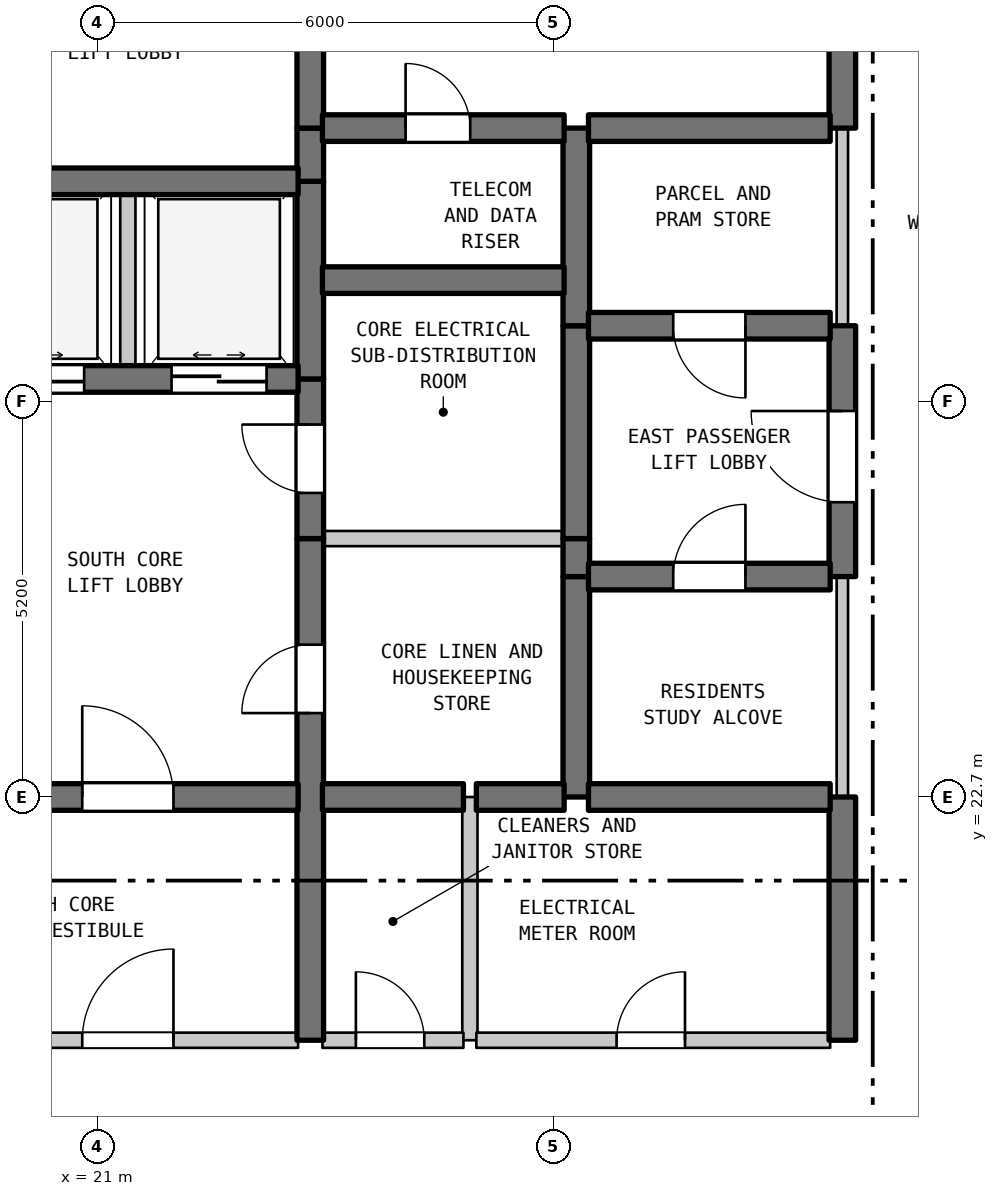
"""IFC4 building model, lengths in metres.
Left out: names, types, materials, properties, quantities, classifications, styles, units other than length and angle.
Written with IfcOpenShell. Run it as: python <this file> out.ifc"""

import sys

from ifc_helpers import new_model, si_unit, direction, frame, frame_2d, origin, place, context, subcontext, project, spatial, rectangle, extrude, element, fill, save


model = new_model("IFC4")
c1 = context("Model", 3, precision=1e-05, world=origin(), true_north=direction((0.0, 1.0)))
c2 = subcontext(c1, "Body", "Model", "MODEL_VIEW")
j1 = project(units=[si_unit("LENGTHUNIT", "METRE"), si_unit("PLANEANGLEUNIT", "RADIAN")], contexts=[c1])
p1 = place(None, origin())
s1 = spatial("IfcSite", under=j1, at=p1, CompositionType="ELEMENT")
p2 = place(p1, origin())
s2 = spatial("IfcBuilding", under=s1, at=p2, CompositionType="ELEMENT")
p3 = place(p2, frame((0.0, 0.0, 291.7)))
s3 = spatial("IfcBuildingStorey", under=s2, at=p3, CompositionType="ELEMENT", Elevation=291.7)
p4 = place(p3, frame((21.4, 28.2, 0.0), z_axis=(0.0, 0.0, 1.0), x_axis=(0.0, 1.0, 0.0)))
e1 = element("IfcWall", 1, at=p4, inside=s3, PredefinedType="STANDARD", context=c2, shape_type="SweptSolid", body=[
    extrude(rectangle(XDim=2.6, YDim=0.2, at=frame_2d((1.3, 0.0))), origin(), (0.0, 0.0, 1.0), 3.39),
])
p5 = place(p3, frame((23.8, 19.5, 0.0), z_axis=(0.0, 0.0, 1.0), x_axis=(0.0, 1.0, 0.0)))
e2 = element("IfcWall", 2, at=p5, inside=s3, PredefinedType="SHEAR", context=c2, shape_type="SweptSolid", body=[
    extrude(rectangle(XDim=6.6, YDim=0.35, at=frame_2d((3.3, 0.0))), origin(), (0.0, 0.0, 1.0), 3.39),
])
p6 = place(p5, frame((4.304, 0.0, 0.0)))
e3 = element("IfcOpeningElement", 3, at=p6, cuts=e2, PredefinedType="OPENING", context=c2, shape_type="SweptSolid", body=[
    extrude(rectangle(XDim=0.9, YDim=2.15, at=frame_2d((0.45, 1.075))), frame((0.0, 0.185, 0.0), z_axis=(0.0, -1.0, 0.0), x_axis=(1.0, 0.0, 0.0)), (0.0, 0.0, 1.0), 0.37),
])
p7 = place(p3, frame((23.8, 26.1, 0.0), z_axis=(0.0, 0.0, 1.0), x_axis=(0.0, 1.0, 0.0)))
e4 = element("IfcWall", 4, at=p7, inside=s3, PredefinedType="SHEAR", context=c2, shape_type="SweptSolid", body=[
    extrude(rectangle(XDim=2.1, YDim=0.35, at=frame_2d((1.05, 0.0))), origin(), (0.0, 0.0, 1.0), 3.39),
])
p8 = place(p7, frame((0.6, 0.0, 0.0)))
e5 = element("IfcOpeningElement", 5, at=p8, cuts=e4, PredefinedType="OPENING", context=c2, shape_type="SweptSolid", body=[
    extrude(rectangle(XDim=0.9, YDim=2.15, at=frame_2d((0.45, 1.075))), frame((0.0, 0.185, 0.0), z_axis=(0.0, -1.0, 0.0), x_axis=(1.0, 0.0, 0.0)), (0.0, 0.0, 1.0), 0.37),
])
p9 = place(p3, frame((23.8, 28.2, 0.0), z_axis=(0.0, 0.0, 1.0), x_axis=(0.0, 1.0, 0.0)))
e6 = element("IfcWall", 6, at=p9, inside=s3, PredefinedType="SHEAR", context=c2, shape_type="SweptSolid", body=[
    extrude(rectangle(XDim=2.6, YDim=0.35, at=frame_2d((1.3, 0.0))), origin(), (0.0, 0.0, 1.0), 3.39),
])
p10 = place(p3, frame((23.8, 30.8, 0.0), z_axis=(0.0, 0.0, 1.0), x_axis=(0.0, 1.0, 0.0)))
e7 = element("IfcWall", 7, at=p10, inside=s3, PredefinedType="SHEAR", context=c2, shape_type="SweptSolid", body=[
    extrude(rectangle(XDim=0.7, YDim=0.35, at=frame_2d((0.35, 0.0))), origin(), (0.0, 0.0, 1.0), 3.39),
])
p11 = place(p3, frame((23.8, 31.5, 0.0), z_axis=(0.0, 0.0, 1.0), x_axis=(0.0, 1.0, 0.0)))
e8 = element("IfcWall", 8, at=p11, inside=s3, PredefinedType="SHEAR", context=c2, shape_type="SweptSolid", body=[
    extrude(rectangle(XDim=3.5, YDim=0.35, at=frame_2d((1.75, 0.0))), origin(), (0.0, 0.0, 1.0), 3.39),
])
p12 = place(p11, frame((1.127, 0.0, 0.0)))
e9 = element("IfcOpeningElement", 9, at=p12, cuts=e8, PredefinedType="OPENING", context=c2, shape_type="SweptSolid", body=[
    extrude(rectangle(XDim=1.1, YDim=2.15, at=frame_2d((0.55, 1.075))), frame((0.0, 0.185, 0.0), z_axis=(0.0, -1.0, 0.0), x_axis=(1.0, 0.0, 0.0)), (0.0, 0.0, 1.0), 0.37),
])
p13 = place(p3, frame((25.9, 19.5, 0.0), z_axis=(0.0, 0.0, 1.0), x_axis=(0.0, 1.0, 0.0)))
e10 = element("IfcWall", 10, at=p13, inside=s3, PredefinedType="STANDARD", context=c2, shape_type="SweptSolid", body=[
    extrude(rectangle(XDim=3.2, YDim=0.2, at=frame_2d((1.6, 0.0))), origin(), (0.0, 0.0, 1.0), 3.39),
])
p14 = place(p3, frame((27.3, 22.7, 0.0), z_axis=(0.0, 0.0, 1.0), x_axis=(0.0, 1.0, 0.0)))
e11 = element("IfcWall", 11, at=p14, inside=s3, PredefinedType="SHEAR", context=c2, shape_type="SweptSolid", body=[
    extrude(rectangle(XDim=2.9, YDim=0.35, at=frame_2d((1.45, 0.0))), origin(), (0.0, 0.0, 1.0), 3.39),
])
p15 = place(p3, frame((27.3, 25.6, 0.0), z_axis=(0.0, 0.0, 1.0), x_axis=(0.0, 1.0, 0.0)))
e12 = element("IfcWall", 12, at=p15, inside=s3, PredefinedType="SHEAR", context=c2, shape_type="SweptSolid", body=[
    extrude(rectangle(XDim=0.5, YDim=0.35, at=frame_2d((0.25, 0.0))), origin(), (0.0, 0.0, 1.0), 3.39),
])
p16 = place(p3, frame((27.3, 26.1, 0.0), z_axis=(0.0, 0.0, 1.0), x_axis=(0.0, 1.0, 0.0)))
e13 = element("IfcWall", 13, at=p16, inside=s3, PredefinedType="SHEAR", context=c2, shape_type="SweptSolid", body=[
    extrude(rectangle(XDim=2.8, YDim=0.35, at=frame_2d((1.4, 0.0))), origin(), (0.0, 0.0, 1.0), 3.39),
])
p17 = place(p3, frame((27.3, 28.9, 0.0), z_axis=(0.0, 0.0, 1.0), x_axis=(0.0, 1.0, 0.0)))
e14 = element("IfcWall", 14, at=p17, inside=s3, PredefinedType="SHEAR", context=c2, shape_type="SweptSolid", body=[
    extrude(rectangle(XDim=2.6, YDim=0.35, at=frame_2d((1.3, 0.0))), origin(), (0.0, 0.0, 1.0), 3.39),
])
p18 = place(p3, frame((30.8, 19.5, 0.0), z_axis=(0.0, 0.0, 1.0), x_axis=(0.0, 1.0, 0.0)))
e15 = element("IfcWall", 15, at=p18, inside=s3, PredefinedType="SHEAR", context=c2, shape_type="SweptSolid", body=[
    extrude(rectangle(XDim=3.2, YDim=0.35, at=frame_2d((1.6, 0.0))), origin(), (0.0, 0.0, 1.0), 3.39),
])
p19 = place(p3, frame((30.8, 22.7, 0.0), z_axis=(0.0, 0.0, 1.0), x_axis=(0.0, 1.0, 0.0)))
e16 = element("IfcWall", 16, at=p19, inside=s3, PredefinedType="STANDARD", context=c2, shape_type="SweptSolid", body=[
    extrude(rectangle(XDim=2.9, YDim=0.15, at=frame_2d((1.45, 0.0))), origin(), (0.0, 0.0, 1.0), 3.39),
])
p20 = place(p3, frame((30.8, 25.6, 0.0), z_axis=(0.0, 0.0, 1.0), x_axis=(0.0, 1.0, 0.0)))
e17 = element("IfcWall", 17, at=p20, inside=s3, PredefinedType="SHEAR", context=c2, shape_type="SweptSolid", body=[
    extrude(rectangle(XDim=3.3, YDim=0.35, at=frame_2d((1.65, 0.0))), origin(), (0.0, 0.0, 1.0), 3.39),
])
p21 = place(p20, frame((0.978, 0.0, 0.0)))
e18 = element("IfcOpeningElement", 18, at=p21, cuts=e17, PredefinedType="OPENING", context=c2, shape_type="SweptSolid", body=[
    extrude(rectangle(XDim=1.2, YDim=2.2, at=frame_2d((0.6, 1.1))), frame((0.0, 0.185, 0.0), z_axis=(0.0, -1.0, 0.0), x_axis=(1.0, 0.0, 0.0)), (0.0, 0.0, 1.0), 0.37),
])
p22 = place(p3, frame((30.8, 28.9, 0.0), z_axis=(0.0, 0.0, 1.0), x_axis=(0.0, 1.0, 0.0)))
e19 = element("IfcWall", 19, at=p22, inside=s3, PredefinedType="STANDARD", context=c2, shape_type="SweptSolid", body=[
    extrude(rectangle(XDim=2.6, YDim=0.15, at=frame_2d((1.3, 0.0))), origin(), (0.0, 0.0, 1.0), 3.39),
])
p23 = place(p3, frame((30.8, 31.5, 0.0), z_axis=(0.0, 0.0, 1.0), x_axis=(0.0, 1.0, 0.0)))
e20 = element("IfcWall", 20, at=p23, inside=s3, PredefinedType="SHEAR", context=c2, shape_type="SweptSolid", body=[
    extrude(rectangle(XDim=3.5, YDim=0.35, at=frame_2d((1.75, 0.0))), origin(), (0.0, 0.0, 1.0), 3.39),
])
p24 = place(p23, frame((1.15, 0.0, 0.0)))
e21 = element("IfcOpeningElement", 21, at=p24, cuts=e20, PredefinedType="OPENING", context=c2, shape_type="SweptSolid", body=[
    extrude(rectangle(XDim=1.2, YDim=2.2, at=frame_2d((0.6, 1.1))), frame((0.0, 0.185, 0.0), z_axis=(0.0, -1.0, 0.0), x_axis=(1.0, 0.0, 0.0)), (0.0, 0.0, 1.0), 0.37),
])
p25 = place(p3, frame((19.16, 19.5, 0.0), z_axis=(0.0, 0.0, 1.0), x_axis=(1.0, 0.0, 0.0)))
e22 = element("IfcWall", 22, at=p25, inside=s3, PredefinedType="STANDARD", context=c2, shape_type="SweptSolid", body=[
    extrude(rectangle(XDim=4.48, YDim=0.2, at=frame_2d((2.24, 0.0))), origin(), (0.0, 0.0, 1.0), 3.39),
])
p26 = place(p25, frame((1.64, 0.0, 0.0)))
e23 = element("IfcOpeningElement", 23, at=p26, cuts=e22, PredefinedType="OPENING", context=c2, shape_type="SweptSolid", body=[
    extrude(rectangle(XDim=1.2, YDim=2.2, at=frame_2d((0.6, 1.1))), frame((0.0, 0.11, 0.0), z_axis=(0.0, -1.0, 0.0), x_axis=(1.0, 0.0, 0.0)), (0.0, 0.0, 1.0), 0.22),
])
p27 = place(p3, frame((23.96, 19.5, 0.0), z_axis=(0.0, 0.0, 1.0), x_axis=(1.0, 0.0, 0.0)))
e24 = element("IfcWall", 24, at=p27, inside=s3, PredefinedType="STANDARD", context=c2, shape_type="SweptSolid", body=[
    extrude(rectangle(XDim=1.855, YDim=0.2, at=frame_2d((0.927, 0.0))), origin(), (0.0, 0.0, 1.0), 3.39),
])
p28 = place(p27, frame((0.44, 0.0, 0.0)))
e25 = element("IfcOpeningElement", 25, at=p28, cuts=e24, PredefinedType="OPENING", context=c2, shape_type="SweptSolid", body=[
    extrude(rectangle(XDim=0.9, YDim=2.15, at=frame_2d((0.45, 1.075))), frame((0.0, 0.11, 0.0), z_axis=(0.0, -1.0, 0.0), x_axis=(1.0, 0.0, 0.0)), (0.0, 0.0, 1.0), 0.22),
])
p29 = place(p3, frame((25.985, 19.5, 0.0), z_axis=(0.0, 0.0, 1.0), x_axis=(1.0, 0.0, 0.0)))
e26 = element("IfcWall", 26, at=p29, inside=s3, PredefinedType="STANDARD", context=c2, shape_type="SweptSolid", body=[
    extrude(rectangle(XDim=4.655, YDim=0.2, at=frame_2d((2.327, 0.0))), origin(), (0.0, 0.0, 1.0), 3.39),
])
p30 = place(p29, frame((1.845, 0.0, 0.0)))
e27 = element("IfcOpeningElement", 27, at=p30, cuts=e26, PredefinedType="OPENING", context=c2, shape_type="SweptSolid", body=[
    extrude(rectangle(XDim=0.9, YDim=2.15, at=frame_2d((0.45, 1.075))), frame((0.0, 0.11, 0.0), z_axis=(0.0, -1.0, 0.0), x_axis=(1.0, 0.0, 0.0)), (0.0, 0.0, 1.0), 0.22),
])
p31 = place(p3, frame((19.16, 22.7, 0.0), z_axis=(0.0, 0.0, 1.0), x_axis=(1.0, 0.0, 0.0)))
e28 = element("IfcWall", 28, at=p31, inside=s3, PredefinedType="SHEAR", context=c2, shape_type="SweptSolid", body=[
    extrude(rectangle(XDim=4.48, YDim=0.35, at=frame_2d((2.24, 0.0))), origin(), (0.0, 0.0, 1.0), 3.39),
])
p32 = place(p31, frame((1.64, 0.0, 0.0)))
e29 = element("IfcOpeningElement", 29, at=p32, cuts=e28, PredefinedType="OPENING", context=c2, shape_type="SweptSolid", body=[
    extrude(rectangle(XDim=1.2, YDim=2.2, at=frame_2d((0.6, 1.1))), frame((0.0, 0.185, 0.0), z_axis=(0.0, -1.0, 0.0), x_axis=(1.0, 0.0, 0.0)), (0.0, 0.0, 1.0), 0.37),
])
p33 = place(p3, frame((23.96, 22.7, 0.0), z_axis=(0.0, 0.0, 1.0), x_axis=(1.0, 0.0, 0.0)))
e30 = element("IfcWall", 30, at=p33, inside=s3, PredefinedType="SHEAR", context=c2, shape_type="SweptSolid", body=[
    extrude(rectangle(XDim=1.855, YDim=0.35, at=frame_2d((0.927, 0.0))), origin(), (0.0, 0.0, 1.0), 3.39),
])
p34 = place(p3, frame((25.985, 22.7, 0.0), z_axis=(0.0, 0.0, 1.0), x_axis=(1.0, 0.0, 0.0)))
e31 = element("IfcWall", 31, at=p34, inside=s3, PredefinedType="SHEAR", context=c2, shape_type="SweptSolid", body=[
    extrude(rectangle(XDim=1.155, YDim=0.35, at=frame_2d((0.577, 0.0))), origin(), (0.0, 0.0, 1.0), 3.39),
])
p35 = place(p3, frame((27.46, 22.7, 0.0), z_axis=(0.0, 0.0, 1.0), x_axis=(1.0, 0.0, 0.0)))
e32 = element("IfcWall", 32, at=p35, inside=s3, PredefinedType="SHEAR", context=c2, shape_type="SweptSolid", body=[
    extrude(rectangle(XDim=3.18, YDim=0.35, at=frame_2d((1.59, 0.0))), origin(), (0.0, 0.0, 1.0), 3.39),
])
p36 = place(p3, frame((27.46, 25.6, 0.0), z_axis=(0.0, 0.0, 1.0), x_axis=(1.0, 0.0, 0.0)))
e33 = element("IfcWall", 33, at=p36, inside=s3, PredefinedType="SHEAR", context=c2, shape_type="SweptSolid", body=[
    extrude(rectangle(XDim=3.18, YDim=0.35, at=frame_2d((1.59, 0.0))), origin(), (0.0, 0.0, 1.0), 3.39),
])
p37 = place(p36, frame((1.115, 0.0, 0.0)))
e34 = element("IfcOpeningElement", 34, at=p37, cuts=e33, PredefinedType="OPENING", context=c2, shape_type="SweptSolid", body=[
    extrude(rectangle(XDim=0.95, YDim=2.15, at=frame_2d((0.475, 1.075))), frame((0.0, 0.185, 0.0), z_axis=(0.0, -1.0, 0.0), x_axis=(1.0, 0.0, 0.0)), (0.0, 0.0, 1.0), 0.37),
])
p38 = place(p3, frame((23.96, 26.1, 0.0), z_axis=(0.0, 0.0, 1.0), x_axis=(1.0, 0.0, 0.0)))
e35 = element("IfcWall", 35, at=p38, inside=s3, PredefinedType="STANDARD", context=c2, shape_type="SweptSolid", body=[
    extrude(rectangle(XDim=3.18, YDim=0.2, at=frame_2d((1.59, 0.0))), origin(), (0.0, 0.0, 1.0), 3.39),
])
p39 = place(p3, frame((19.16, 28.2, 0.0), z_axis=(0.0, 0.0, 1.0), x_axis=(1.0, 0.0, 0.0)))
e36 = element("IfcWall", 36, at=p39, inside=s3, PredefinedType="SHEAR", context=c2, shape_type="SweptSolid", body=[
    extrude(rectangle(XDim=4.48, YDim=0.35, at=frame_2d((2.24, 0.0))), origin(), (0.0, 0.0, 1.0), 3.39),
])
p40 = place(p39, frame((0.415, 0.0, 0.0)))
e37 = element("IfcOpeningElement", 37, at=p40, cuts=e36, PredefinedType="OPENING", context=c2, shape_type="SweptSolid", body=[
    extrude(rectangle(XDim=1.25, YDim=2.2, at=frame_2d((0.625, 1.1))), frame((0.0, 0.185, 0.0), z_axis=(0.0, -1.0, 0.0), x_axis=(1.0, 0.0, 0.0)), (0.0, 0.0, 1.0), 0.37),
])
p41 = place(p39, frame((2.815, 0.0, 0.0)))
e38 = element("IfcOpeningElement", 38, at=p41, cuts=e36, PredefinedType="OPENING", context=c2, shape_type="SweptSolid", body=[
    extrude(rectangle(XDim=1.25, YDim=2.2, at=frame_2d((0.625, 1.1))), frame((0.0, 0.185, 0.0), z_axis=(0.0, -1.0, 0.0), x_axis=(1.0, 0.0, 0.0)), (0.0, 0.0, 1.0), 0.37),
])
p42 = place(p3, frame((27.46, 28.9, 0.0), z_axis=(0.0, 0.0, 1.0), x_axis=(1.0, 0.0, 0.0)))
e39 = element("IfcWall", 39, at=p42, inside=s3, PredefinedType="SHEAR", context=c2, shape_type="SweptSolid", body=[
    extrude(rectangle(XDim=3.18, YDim=0.35, at=frame_2d((1.59, 0.0))), origin(), (0.0, 0.0, 1.0), 3.39),
])
p43 = place(p42, frame((1.115, 0.0, 0.0)))
e40 = element("IfcOpeningElement", 40, at=p43, cuts=e39, PredefinedType="OPENING", context=c2, shape_type="SweptSolid", body=[
    extrude(rectangle(XDim=0.95, YDim=2.15, at=frame_2d((0.475, 1.075))), frame((0.0, 0.185, 0.0), z_axis=(0.0, -1.0, 0.0), x_axis=(1.0, 0.0, 0.0)), (0.0, 0.0, 1.0), 0.37),
])
p44 = place(p3, frame((23.96, 29.5, 0.0), z_axis=(0.0, 0.0, 1.0), x_axis=(1.0, 0.0, 0.0)))
e41 = element("IfcWall", 41, at=p44, inside=s3, PredefinedType="SHEAR", context=c2, shape_type="SweptSolid", body=[
    extrude(rectangle(XDim=3.18, YDim=0.35, at=frame_2d((1.59, 0.0))), origin(), (0.0, 0.0, 1.0), 3.39),
])
p45 = place(p3, frame((19.16, 30.8, 0.0), z_axis=(0.0, 0.0, 1.0), x_axis=(1.0, 0.0, 0.0)))
e42 = element("IfcWall", 42, at=p45, inside=s3, PredefinedType="SHEAR", context=c2, shape_type="SweptSolid", body=[
    extrude(rectangle(XDim=4.48, YDim=0.35, at=frame_2d((2.24, 0.0))), origin(), (0.0, 0.0, 1.0), 3.39),
])
p46 = place(p3, frame((23.96, 31.5, 0.0), z_axis=(0.0, 0.0, 1.0), x_axis=(1.0, 0.0, 0.0)))
e43 = element("IfcWall", 43, at=p46, inside=s3, PredefinedType="SHEAR", context=c2, shape_type="SweptSolid", body=[
    extrude(rectangle(XDim=3.18, YDim=0.35, at=frame_2d((1.59, 0.0))), origin(), (0.0, 0.0, 1.0), 3.39),
])
p47 = place(p46, frame((1.094, 0.0, 0.0)))
e44 = element("IfcOpeningElement", 44, at=p47, cuts=e43, PredefinedType="OPENING", context=c2, shape_type="SweptSolid", body=[
    extrude(rectangle(XDim=0.85, YDim=2.1, at=frame_2d((0.425, 1.05))), frame((0.0, 0.185, 0.0), z_axis=(0.0, -1.0, 0.0), x_axis=(1.0, 0.0, 0.0)), (0.0, 0.0, 1.0), 0.37),
])
p48 = place(p3, frame((27.46, 31.5, 0.0), z_axis=(0.0, 0.0, 1.0), x_axis=(1.0, 0.0, 0.0)))
e45 = element("IfcWall", 45, at=p48, inside=s3, PredefinedType="SHEAR", context=c2, shape_type="SweptSolid", body=[
    extrude(rectangle(XDim=3.18, YDim=0.35, at=frame_2d((1.59, 0.0))), origin(), (0.0, 0.0, 1.0), 3.39),
])
p49 = place(p6, origin())
e46 = element("IfcDoor", 46, at=p49, inside=s3, OperationType="SINGLE_SWING_LEFT", PredefinedType="DOOR", context=c2, shape_type="SweptSolid", body=[
    extrude(rectangle(XDim=0.9, YDim=2.15, at=frame_2d((0.45, 1.075))), frame((0.0, 0.025, 0.0), z_axis=(0.0, -1.0, 0.0), x_axis=(1.0, 0.0, 0.0)), (0.0, 0.0, 1.0), 0.05),
])
fill(e3, e46)
p50 = place(p8, origin())
e47 = element("IfcDoor", 47, at=p50, inside=s3, OperationType="SINGLE_SWING_RIGHT", PredefinedType="DOOR", context=c2, shape_type="SweptSolid", body=[
    extrude(rectangle(XDim=0.9, YDim=2.15, at=frame_2d((0.45, 1.075))), frame((0.0, 0.025, 0.0), z_axis=(0.0, -1.0, 0.0), x_axis=(1.0, 0.0, 0.0)), (0.0, 0.0, 1.0), 0.05),
])
fill(e5, e47)
p51 = place(p21, origin())
e48 = element("IfcDoor", 48, at=p51, inside=s3, OperationType="SINGLE_SWING_RIGHT", PredefinedType="DOOR", context=c2, shape_type="SweptSolid", body=[
    extrude(rectangle(XDim=1.2, YDim=2.2, at=frame_2d((0.6, 1.1))), frame((0.0, 0.025, 0.0), z_axis=(0.0, -1.0, 0.0), x_axis=(1.0, 0.0, 0.0)), (0.0, 0.0, 1.0), 0.05),
])
fill(e18, e48)
p52 = place(p26, origin())
e49 = element("IfcDoor", 49, at=p52, inside=s3, OperationType="SINGLE_SWING_RIGHT", PredefinedType="DOOR", context=c2, shape_type="SweptSolid", body=[
    extrude(rectangle(XDim=1.2, YDim=2.2, at=frame_2d((0.6, 1.1))), frame((0.0, 0.025, 0.0), z_axis=(0.0, -1.0, 0.0), x_axis=(1.0, 0.0, 0.0)), (0.0, 0.0, 1.0), 0.05),
])
fill(e23, e49)
p53 = place(p28, origin())
e50 = element("IfcDoor", 50, at=p53, inside=s3, OperationType="SINGLE_SWING_LEFT", PredefinedType="DOOR", context=c2, shape_type="SweptSolid", body=[
    extrude(rectangle(XDim=0.9, YDim=2.15, at=frame_2d((0.45, 1.075))), frame((0.0, 0.025, 0.0), z_axis=(0.0, -1.0, 0.0), x_axis=(1.0, 0.0, 0.0)), (0.0, 0.0, 1.0), 0.05),
])
fill(e25, e50)
p54 = place(p30, origin())
e51 = element("IfcDoor", 51, at=p54, inside=s3, OperationType="SINGLE_SWING_RIGHT", PredefinedType="DOOR", context=c2, shape_type="SweptSolid", body=[
    extrude(rectangle(XDim=0.9, YDim=2.15, at=frame_2d((0.45, 1.075))), frame((0.0, 0.025, 0.0), z_axis=(0.0, -1.0, 0.0), x_axis=(1.0, 0.0, 0.0)), (0.0, 0.0, 1.0), 0.05),
])
fill(e27, e51)
p55 = place(p32, origin())
e52 = element("IfcDoor", 52, at=p55, inside=s3, OperationType="SINGLE_SWING_LEFT", PredefinedType="DOOR", context=c2, shape_type="SweptSolid", body=[
    extrude(rectangle(XDim=1.2, YDim=2.2, at=frame_2d((0.6, 1.1))), frame((0.0, 0.025, 0.0), z_axis=(0.0, -1.0, 0.0), x_axis=(1.0, 0.0, 0.0)), (0.0, 0.0, 1.0), 0.05),
])
fill(e29, e52)
p56 = place(p37, origin())
e53 = element("IfcDoor", 53, at=p56, inside=s3, OperationType="SINGLE_SWING_RIGHT", PredefinedType="DOOR", context=c2, shape_type="SweptSolid", body=[
    extrude(rectangle(XDim=0.95, YDim=2.15, at=frame_2d((0.475, 1.075))), frame((0.0, 0.025, 0.0), z_axis=(0.0, -1.0, 0.0), x_axis=(1.0, 0.0, 0.0)), (0.0, 0.0, 1.0), 0.05),
])
fill(e34, e53)
p57 = place(p40, origin())
e54 = element("IfcDoor", 54, at=p57, inside=s3, OperationType="DOUBLE_DOOR_SLIDING", PredefinedType="DOOR", context=c2, shape_type="SweptSolid", body=[
    extrude(rectangle(XDim=1.25, YDim=2.2, at=frame_2d((0.625, 1.1))), frame((0.0, 0.025, 0.0), z_axis=(0.0, -1.0, 0.0), x_axis=(1.0, 0.0, 0.0)), (0.0, 0.0, 1.0), 0.05),
])
fill(e37, e54)
p58 = place(p41, origin())
e55 = element("IfcDoor", 55, at=p58, inside=s3, OperationType="DOUBLE_DOOR_SLIDING", PredefinedType="DOOR", context=c2, shape_type="SweptSolid", body=[
    extrude(rectangle(XDim=1.25, YDim=2.2, at=frame_2d((0.625, 1.1))), frame((0.0, 0.025, 0.0), z_axis=(0.0, -1.0, 0.0), x_axis=(1.0, 0.0, 0.0)), (0.0, 0.0, 1.0), 0.05),
])
fill(e38, e55)
p59 = place(p43, frame((0.95, 0.0, 0.0), z_axis=(0.0, 0.0, 1.0), x_axis=(-1.0, 0.0, 0.0)))
e56 = element("IfcDoor", 56, at=p59, inside=s3, OperationType="SINGLE_SWING_RIGHT", PredefinedType="DOOR", context=c2, shape_type="SweptSolid", body=[
    extrude(rectangle(XDim=0.95, YDim=2.15, at=frame_2d((0.475, 1.075))), frame((0.0, 0.025, 0.0), z_axis=(0.0, -1.0, 0.0), x_axis=(1.0, 0.0, 0.0)), (0.0, 0.0, 1.0), 0.05),
])
fill(e40, e56)
p60 = place(p47, origin())
e57 = element("IfcDoor", 57, at=p60, inside=s3, OperationType="SINGLE_SWING_LEFT", PredefinedType="DOOR", context=c2, shape_type="SweptSolid", body=[
    extrude(rectangle(XDim=0.85, YDim=2.1, at=frame_2d((0.425, 1.05))), frame((0.0, 0.025, 0.0), z_axis=(0.0, -1.0, 0.0), x_axis=(1.0, 0.0, 0.0)), (0.0, 0.0, 1.0), 0.05),
])
fill(e44, e57)
save(model, sys.argv[1])
